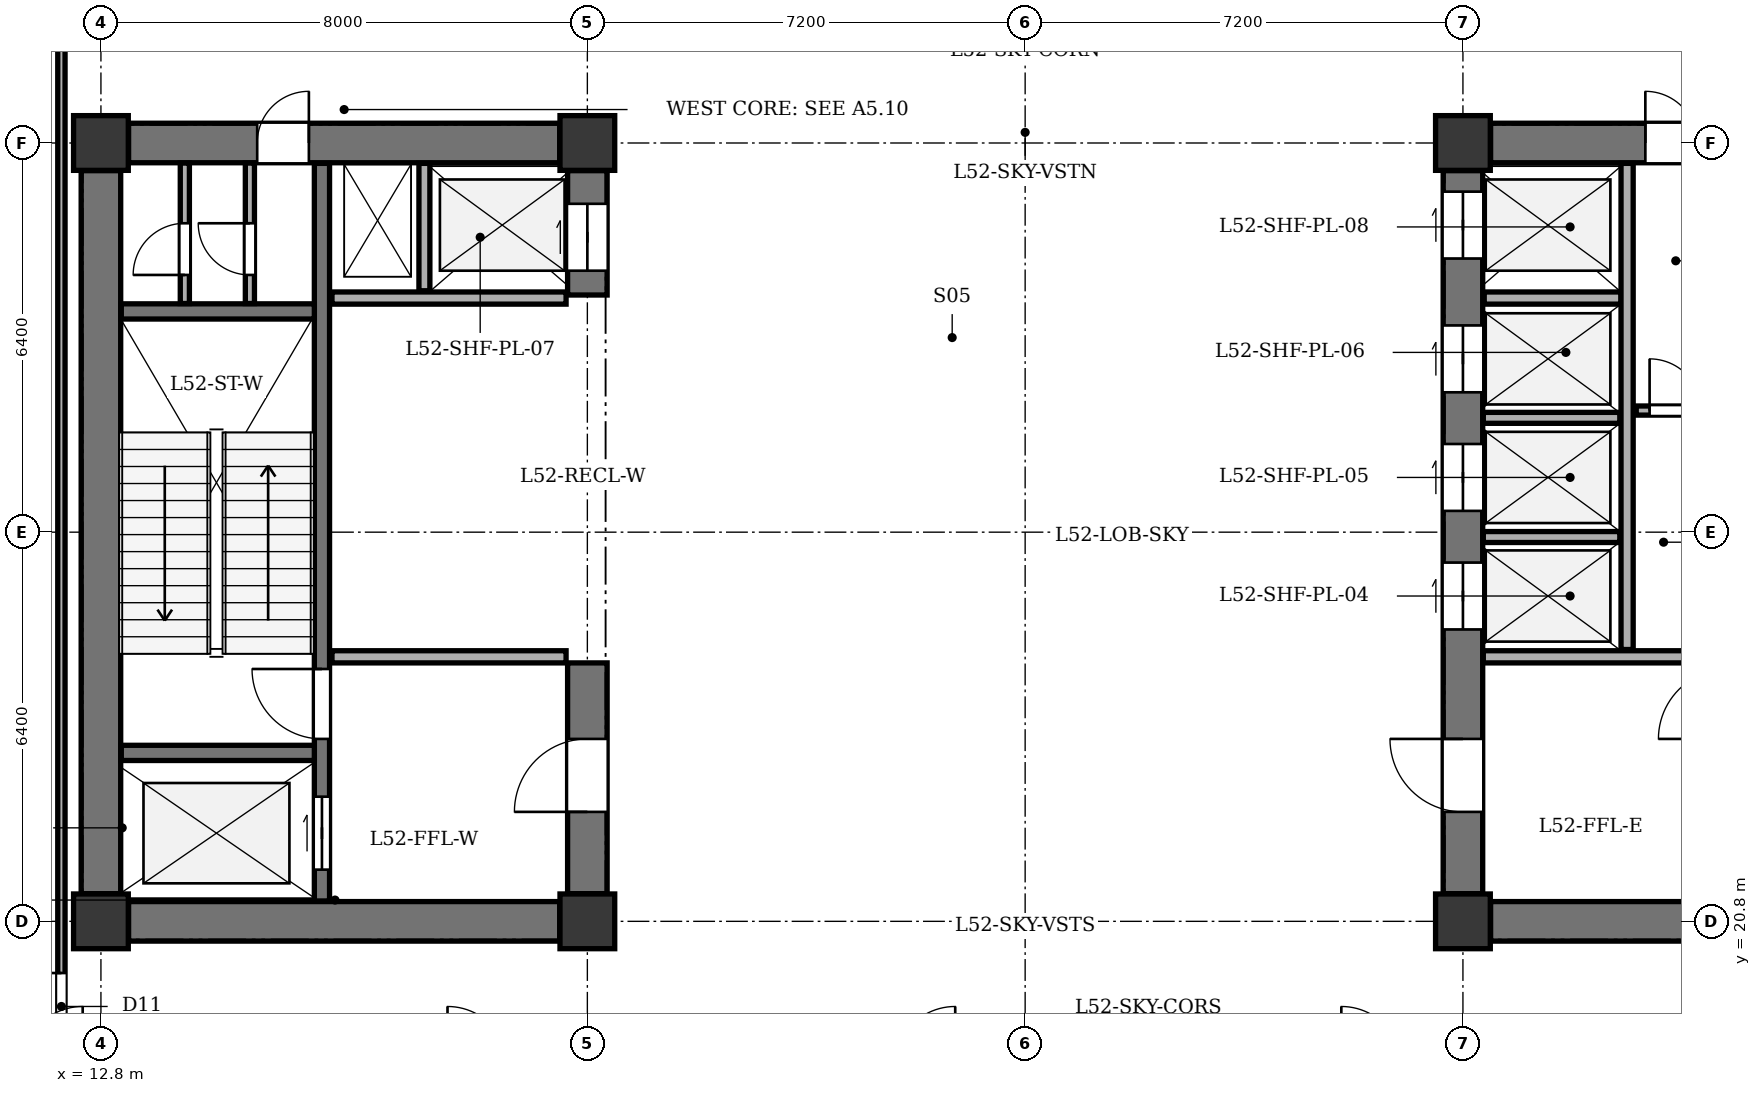
"""IFC4 building model, lengths in metres.
Left out: names, types, materials, properties, quantities, classifications, styles, units other than length and angle.
Written with IfcOpenShell. Run it as: python <this file> out.ifc"""

import sys

from ifc_helpers import new_model, si_unit, direction, frame, frame_2d, origin, origin_2d, place, context, subcontext, project, spatial, rectangle, extrude, element, fill, save


model = new_model("IFC4")
c1 = context("Model", 3, precision=1e-05, world=origin(), true_north=direction((0.0, 1.0)))
c2 = subcontext(c1, "Body", "Model", "MODEL_VIEW")
j1 = project(units=[si_unit("LENGTHUNIT", "METRE"), si_unit("PLANEANGLEUNIT", "RADIAN")], contexts=[c1])
p1 = place(None, origin())
s1 = spatial("IfcSite", under=j1, at=p1, CompositionType="ELEMENT")
p2 = place(p1, origin())
s2 = spatial("IfcBuilding", under=s1, at=p2, CompositionType="ELEMENT")
p3 = place(p2, frame((0.0, 0.0, 202.7)))
s3 = spatial("IfcBuildingStorey", under=s2, at=p3, CompositionType="ELEMENT", Elevation=202.7)
for number, where, z_axis, x_axis in (
    (1, (12.8, 20.8, 0.0), (0.0, 0.0, 1.0), (1.0, 0.0, 0.0)),
    (2, (20.8, 20.8, 0.0), (0.0, 0.0, 1.0), (1.0, 0.0, 0.0)),
    (3, (12.8, 33.6, 0.0), (0.0, 0.0, 1.0), (1.0, 0.0, 0.0)),
    (4, (20.8, 33.6, 0.0), (0.0, 0.0, 1.0), (1.0, 0.0, 0.0)),
    (5, (35.2, 20.8, 0.0), (0.0, 0.0, 1.0), (1.0, 0.0, 0.0)),
    (6, (35.2, 33.6, 0.0), (0.0, 0.0, 1.0), (1.0, 0.0, 0.0)),
):
    element("IfcColumn", number, at=place(p3, frame(where, z_axis=z_axis, x_axis=x_axis)), inside=s3, PredefinedType="COLUMN", context=c2, shape_type="SweptSolid", body=[
        extrude(rectangle(XDim=0.9, YDim=0.9, at=origin_2d()), origin(), (0.0, 0.0, 1.0), 4.8),
    ])
p4 = place(p3, frame((12.8, 21.255, 0.0), z_axis=(0.0, 0.0, 1.0), x_axis=(0.0, 1.0, 0.0)))
e7 = element("IfcWall", 7, at=p4, inside=s3, PredefinedType="SHEAR", context=c2, shape_type="SweptSolid", body=[
    extrude(rectangle(XDim=11.89, YDim=0.65, at=frame_2d((5.945, 0.0))), origin(), (0.0, 0.0, 1.0), 4.35),
])
p5 = place(p3, frame((13.255, 20.8, 0.0), z_axis=(0.0, 0.0, 1.0), x_axis=(1.0, 0.0, 0.0)))
e8 = element("IfcWall", 8, at=p5, inside=s3, PredefinedType="SHEAR", context=c2, shape_type="SweptSolid", body=[
    extrude(rectangle(XDim=7.09, YDim=0.65, at=frame_2d((3.545, 0.0))), origin(), (0.0, 0.0, 1.0), 4.35),
])
p6 = place(p3, frame((13.255, 33.6, 0.0), z_axis=(0.0, 0.0, 1.0), x_axis=(1.0, 0.0, 0.0)))
e9 = element("IfcWall", 9, at=p6, inside=s3, PredefinedType="SHEAR", context=c2, shape_type="SweptSolid", body=[
    extrude(rectangle(XDim=7.09, YDim=0.65, at=frame_2d((3.545, 0.0))), origin(), (0.0, 0.0, 1.0), 4.35),
])
p7 = place(p6, frame((2.115, 0.0, 0.0)))
e10 = element("IfcOpeningElement", 10, at=p7, cuts=e9, PredefinedType="OPENING", context=c2, shape_type="SweptSolid", body=[
    extrude(rectangle(XDim=0.85, YDim=2.02, at=frame_2d((0.425, 1.01))), frame((0.0, 0.335, 0.0), z_axis=(0.0, -1.0, 0.0), x_axis=(1.0, 0.0, 0.0)), (0.0, 0.0, 1.0), 0.67),
])
p8 = place(p3, frame((20.8, 21.255, 0.0), z_axis=(0.0, 0.0, 1.0), x_axis=(0.0, 1.0, 0.0)))
e11 = element("IfcWall", 11, at=p8, inside=s3, PredefinedType="SHEAR", context=c2, shape_type="SweptSolid", body=[
    extrude(rectangle(XDim=3.795, YDim=0.65, at=frame_2d((1.897, 0.0))), origin(), (0.0, 0.0, 1.0), 4.35),
])
p9 = place(p8, frame((1.345, 0.0, 0.0)))
e12 = element("IfcOpeningElement", 12, at=p9, cuts=e11, PredefinedType="OPENING", context=c2, shape_type="SweptSolid", body=[
    extrude(rectangle(XDim=1.2, YDim=2.15, at=frame_2d((0.6, 1.075))), frame((0.0, 0.335, 0.0), z_axis=(0.0, -1.0, 0.0), x_axis=(1.0, 0.0, 0.0)), (0.0, 0.0, 1.0), 0.67),
])
p10 = place(p3, frame((20.8, 31.1, 0.0), z_axis=(0.0, 0.0, 1.0), x_axis=(0.0, 1.0, 0.0)))
e13 = element("IfcWall", 13, at=p10, inside=s3, PredefinedType="SHEAR", context=c2, shape_type="SweptSolid", body=[
    extrude(rectangle(XDim=2.045, YDim=0.65, at=frame_2d((1.022, 0.0))), origin(), (0.0, 0.0, 1.0), 4.35),
])
p11 = place(p10, frame((0.4, 0.0, 0.0)))
e14 = element("IfcOpeningElement", 14, at=p11, cuts=e13, PredefinedType="OPENING", context=c2, shape_type="SweptSolid", body=[
    extrude(rectangle(XDim=1.1, YDim=2.1, at=frame_2d((0.55, 1.05))), frame((0.0, 0.335, 0.0), z_axis=(0.0, -1.0, 0.0), x_axis=(1.0, 0.0, 0.0)), (0.0, 0.0, 1.0), 0.67),
])
p12 = place(p3, frame((16.435, 21.135, 0.0), z_axis=(0.0, 0.0, 1.0), x_axis=(0.0, 1.0, 0.0)))
e15 = element("IfcWall", 15, at=p12, inside=s3, PredefinedType="SHEAR", context=c2, shape_type="SweptSolid", body=[
    extrude(rectangle(XDim=12.13, YDim=0.25, at=frame_2d((6.065, 0.0))), origin(), (0.0, 0.0, 1.0), 4.35),
])
p13 = place(p12, frame((0.515, 0.0, 0.0)))
e16 = element("IfcOpeningElement", 16, at=p13, cuts=e15, PredefinedType="OPENING", context=c2, shape_type="SweptSolid", body=[
    extrude(rectangle(XDim=1.2, YDim=2.15, at=frame_2d((0.6, 1.075))), frame((0.0, 0.135, 0.0), z_axis=(0.0, -1.0, 0.0), x_axis=(1.0, 0.0, 0.0)), (0.0, 0.0, 1.0), 0.27),
])
p14 = place(p12, frame((2.665, 0.0, 0.0)))
e17 = element("IfcOpeningElement", 17, at=p14, cuts=e15, PredefinedType="OPENING", context=c2, shape_type="SweptSolid", body=[
    extrude(rectangle(XDim=1.15, YDim=2.15, at=frame_2d((0.575, 1.075))), frame((0.0, 0.135, 0.0), z_axis=(0.0, -1.0, 0.0), x_axis=(1.0, 0.0, 0.0)), (0.0, 0.0, 1.0), 0.27),
])
for number, where, z_axis, x_axis in (
    (18, (13.135, 23.57, 0.0), (0.0, 0.0, 1.0), (1.0, 0.0, 0.0)),
    (19, (13.135, 30.83, 0.0), (0.0, 0.0, 1.0), (1.0, 0.0, 0.0)),
):
    element("IfcWall", number, at=place(p3, frame(where, z_axis=z_axis, x_axis=x_axis)), inside=s3, PredefinedType="SHEAR", context=c2, shape_type="SweptSolid", body=[
        extrude(rectangle(XDim=3.175, YDim=0.25, at=frame_2d((1.587, 0.0))), origin(), (0.0, 0.0, 1.0), 4.35),
    ])
for number, where, z_axis, x_axis in (
    (20, (16.6, 25.15, 0.0), (0.0, 0.0, 1.0), (1.0, 0.0, 0.0)),
    (21, (16.6, 31.05, 0.0), (0.0, 0.0, 1.0), (1.0, 0.0, 0.0)),
):
    element("IfcWall", number, at=place(p3, frame(where, z_axis=z_axis, x_axis=x_axis)), inside=s3, PredefinedType="SOLIDWALL", context=c2, shape_type="SweptSolid", body=[
        extrude(rectangle(XDim=3.85, YDim=0.2, at=frame_2d((1.925, 0.0))), origin(), (0.0, 0.0, 1.0), 4.35),
    ])
p15 = place(p3, frame((18.12, 31.17, 0.0), z_axis=(0.0, 0.0, 1.0), x_axis=(0.0, 1.0, 0.0)))
e22 = element("IfcWall", 22, at=p15, inside=s3, PredefinedType="PARTITIONING", context=c2, shape_type="SweptSolid", body=[
    extrude(rectangle(XDim=2.095, YDim=0.18, at=frame_2d((1.047, 0.0))), origin(), (0.0, 0.0, 1.0), 4.35),
])
p16 = place(p3, frame((35.655, 20.8, 0.0), z_axis=(0.0, 0.0, 1.0), x_axis=(1.0, 0.0, 0.0)))
e23 = element("IfcWall", 23, at=p16, inside=s3, PredefinedType="SHEAR", context=c2, shape_type="SweptSolid", body=[
    extrude(rectangle(XDim=7.09, YDim=0.65, at=frame_2d((3.545, 0.0))), origin(), (0.0, 0.0, 1.0), 4.35),
])
p17 = place(p3, frame((35.655, 33.6, 0.0), z_axis=(0.0, 0.0, 1.0), x_axis=(1.0, 0.0, 0.0)))
e24 = element("IfcWall", 24, at=p17, inside=s3, PredefinedType="SHEAR", context=c2, shape_type="SweptSolid", body=[
    extrude(rectangle(XDim=7.09, YDim=0.65, at=frame_2d((3.545, 0.0))), origin(), (0.0, 0.0, 1.0), 4.35),
])
p18 = place(p17, frame((4.745, 0.0, 0.0)))
e25 = element("IfcOpeningElement", 25, at=p18, cuts=e24, PredefinedType="OPENING", context=c2, shape_type="SweptSolid", body=[
    extrude(rectangle(XDim=1.3, YDim=2.15, at=frame_2d((0.65, 1.075))), frame((0.0, 0.335, 0.0), z_axis=(0.0, -1.0, 0.0), x_axis=(1.0, 0.0, 0.0)), (0.0, 0.0, 1.0), 0.67),
])
p19 = place(p17, frame((2.545, 0.0, 0.0)))
e26 = element("IfcOpeningElement", 26, at=p19, cuts=e24, PredefinedType="OPENING", context=c2, shape_type="SweptSolid", body=[
    extrude(rectangle(XDim=0.85, YDim=2.02, at=frame_2d((0.425, 1.01))), frame((0.0, 0.335, 0.0), z_axis=(0.0, -1.0, 0.0), x_axis=(1.0, 0.0, 0.0)), (0.0, 0.0, 1.0), 0.67),
])
p20 = place(p3, frame((35.2, 21.255, 0.0), z_axis=(0.0, 0.0, 1.0), x_axis=(0.0, 1.0, 0.0)))
e27 = element("IfcWall", 27, at=p20, inside=s3, PredefinedType="SHEAR", context=c2, shape_type="SweptSolid", body=[
    extrude(rectangle(XDim=11.89, YDim=0.65, at=frame_2d((5.945, 0.0))), origin(), (0.0, 0.0, 1.0), 4.35),
])
p21 = place(p20, frame((1.345, 0.0, 0.0)))
e28 = element("IfcOpeningElement", 28, at=p21, cuts=e27, PredefinedType="OPENING", context=c2, shape_type="SweptSolid", body=[
    extrude(rectangle(XDim=1.2, YDim=2.15, at=frame_2d((0.6, 1.075))), frame((0.0, 0.335, 0.0), z_axis=(0.0, -1.0, 0.0), x_axis=(1.0, 0.0, 0.0)), (0.0, 0.0, 1.0), 0.67),
])
p22 = place(p20, frame((4.345, 0.0, 0.0)))
e29 = element("IfcOpeningElement", 29, at=p22, cuts=e27, PredefinedType="OPENING", context=c2, shape_type="SweptSolid", body=[
    extrude(rectangle(XDim=1.1, YDim=2.1, at=frame_2d((0.55, 1.05))), frame((0.0, 0.335, 0.0), z_axis=(0.0, -1.0, 0.0), x_axis=(1.0, 0.0, 0.0)), (0.0, 0.0, 1.0), 0.67),
])
p23 = place(p20, frame((6.295, 0.0, 0.0)))
e30 = element("IfcOpeningElement", 30, at=p23, cuts=e27, PredefinedType="OPENING", context=c2, shape_type="SweptSolid", body=[
    extrude(rectangle(XDim=1.1, YDim=2.1, at=frame_2d((0.55, 1.05))), frame((0.0, 0.335, 0.0), z_axis=(0.0, -1.0, 0.0), x_axis=(1.0, 0.0, 0.0)), (0.0, 0.0, 1.0), 0.67),
])
p24 = place(p20, frame((8.245, 0.0, 0.0)))
e31 = element("IfcOpeningElement", 31, at=p24, cuts=e27, PredefinedType="OPENING", context=c2, shape_type="SweptSolid", body=[
    extrude(rectangle(XDim=1.1, YDim=2.1, at=frame_2d((0.55, 1.05))), frame((0.0, 0.335, 0.0), z_axis=(0.0, -1.0, 0.0), x_axis=(1.0, 0.0, 0.0)), (0.0, 0.0, 1.0), 0.67),
])
p25 = place(p20, frame((10.445, 0.0, 0.0)))
e32 = element("IfcOpeningElement", 32, at=p25, cuts=e27, PredefinedType="OPENING", context=c2, shape_type="SweptSolid", body=[
    extrude(rectangle(XDim=1.1, YDim=2.1, at=frame_2d((0.55, 1.05))), frame((0.0, 0.335, 0.0), z_axis=(0.0, -1.0, 0.0), x_axis=(1.0, 0.0, 0.0)), (0.0, 0.0, 1.0), 0.67),
])
p26 = place(p3, frame((35.535, 25.15, 0.0), z_axis=(0.0, 0.0, 1.0), x_axis=(1.0, 0.0, 0.0)))
e33 = element("IfcWall", 33, at=p26, inside=s3, PredefinedType="SOLIDWALL", context=c2, shape_type="SweptSolid", body=[
    extrude(rectangle(XDim=3.865, YDim=0.2, at=frame_2d((1.933, 0.0))), origin(), (0.0, 0.0, 1.0), 4.35),
])
p27 = place(p3, frame((35.55, 31.05, 0.0), z_axis=(0.0, 0.0, 1.0), x_axis=(1.0, 0.0, 0.0)))
e34 = element("IfcWall", 34, at=p27, inside=s3, PredefinedType="SOLIDWALL", context=c2, shape_type="SweptSolid", body=[
    extrude(rectangle(XDim=2.25, YDim=0.2, at=frame_2d((1.125, 0.0))), origin(), (0.0, 0.0, 1.0), 4.35),
])
p28 = place(p3, frame((37.9, 25.27, 0.0), z_axis=(0.0, 0.0, 1.0), x_axis=(0.0, 1.0, 0.0)))
e35 = element("IfcWall", 35, at=p28, inside=s3, PredefinedType="SOLIDWALL", context=c2, shape_type="SweptSolid", body=[
    extrude(rectangle(XDim=7.995, YDim=0.2, at=frame_2d((3.998, 0.0))), origin(), (0.0, 0.0, 1.0), 4.35),
])
for number, where, z_axis, x_axis in (
    (36, (35.535, 27.12, 0.0), (0.0, 0.0, 1.0), (1.0, 0.0, 0.0)),
    (37, (35.535, 29.08, 0.0), (0.0, 0.0, 1.0), (1.0, 0.0, 0.0)),
):
    element("IfcWall", number, at=place(p3, frame(where, z_axis=z_axis, x_axis=x_axis)), inside=s3, PredefinedType="PARTITIONING", context=c2, shape_type="SweptSolid", body=[
        extrude(rectangle(XDim=2.245, YDim=0.18, at=frame_2d((1.123, 0.0))), origin(), (0.0, 0.0, 1.0), 4.35),
    ])
p29 = place(p3, frame((14.18, 30.96, 0.0), z_axis=(0.0, 0.0, 1.0), x_axis=(0.0, 1.0, 0.0)))
e38 = element("IfcWall", 38, at=p29, inside=s3, PredefinedType="PARTITIONING", context=c2, shape_type="SweptSolid", body=[
    extrude(rectangle(XDim=2.31, YDim=0.15, at=frame_2d((1.155, 0.0))), origin(), (0.0, 0.0, 1.0), 4.35),
])
p30 = place(p29, frame((0.47, 0.0, 0.0)))
e39 = element("IfcOpeningElement", 39, at=p30, cuts=e38, PredefinedType="OPENING", context=c2, shape_type="SweptSolid", body=[
    extrude(rectangle(XDim=0.85, YDim=2.02, at=frame_2d((0.425, 1.01))), frame((0.0, 0.085, 0.0), z_axis=(0.0, -1.0, 0.0), x_axis=(1.0, 0.0, 0.0)), (0.0, 0.0, 1.0), 0.17),
])
p31 = place(p3, frame((15.25, 30.96, 0.0), z_axis=(0.0, 0.0, 1.0), x_axis=(0.0, 1.0, 0.0)))
e40 = element("IfcWall", 40, at=p31, inside=s3, PredefinedType="PARTITIONING", context=c2, shape_type="SweptSolid", body=[
    extrude(rectangle(XDim=2.31, YDim=0.15, at=frame_2d((1.155, 0.0))), origin(), (0.0, 0.0, 1.0), 4.35),
])
p32 = place(p31, frame((0.47, 0.0, 0.0)))
e41 = element("IfcOpeningElement", 41, at=p32, cuts=e40, PredefinedType="OPENING", context=c2, shape_type="SweptSolid", body=[
    extrude(rectangle(XDim=0.85, YDim=2.02, at=frame_2d((0.425, 1.01))), frame((0.0, 0.085, 0.0), z_axis=(0.0, -1.0, 0.0), x_axis=(1.0, 0.0, 0.0)), (0.0, 0.0, 1.0), 0.17),
])
p33 = place(p3, frame((38.05, 29.2, 0.0), z_axis=(0.0, 0.0, 1.0), x_axis=(1.0, 0.0, 0.0)))
e42 = element("IfcWall", 42, at=p33, inside=s3, PredefinedType="PARTITIONING", context=c2, shape_type="SweptSolid", body=[
    extrude(rectangle(XDim=1.3, YDim=0.15, at=frame_2d((0.65, 0.0))), origin(), (0.0, 0.0, 1.0), 4.35),
])
p34 = place(p33, frame((0.22, 0.0, 0.0)))
e43 = element("IfcOpeningElement", 43, at=p34, cuts=e42, PredefinedType="OPENING", context=c2, shape_type="SweptSolid", body=[
    extrude(rectangle(XDim=0.85, YDim=2.02, at=frame_2d((0.425, 1.01))), frame((0.0, 0.085, 0.0), z_axis=(0.0, -1.0, 0.0), x_axis=(1.0, 0.0, 0.0)), (0.0, 0.0, 1.0), 0.17),
])
p35 = place(p3, frame((12.15, 18.465, 0.0), z_axis=(0.0, 0.0, 1.0), x_axis=(0.0, 1.0, 0.0)))
e44 = element("IfcWall", 44, at=p35, inside=s3, PredefinedType="PARTITIONING", context=c2, shape_type="SweptSolid", body=[
    extrude(rectangle(XDim=17.67, YDim=0.12, at=frame_2d((8.835, 0.0))), origin(), (0.0, 0.0, 1.0), 4.35),
])
p36 = place(p35, frame((0.385, 0.0, 0.0)))
e45 = element("IfcOpeningElement", 45, at=p36, cuts=e44, PredefinedType="OPENING", context=c2, shape_type="SweptSolid", body=[
    extrude(rectangle(XDim=1.1, YDim=2.15, at=frame_2d((0.55, 1.075))), frame((0.0, 0.07, 0.0), z_axis=(0.0, -1.0, 0.0), x_axis=(1.0, 0.0, 0.0)), (0.0, 0.0, 1.0), 0.14),
])
p37 = place(p7, origin())
e46 = element("IfcDoor", 46, at=p37, inside=s3, OperationType="SINGLE_SWING_RIGHT", PredefinedType="DOOR", context=c2, shape_type="SweptSolid", body=[
    extrude(rectangle(XDim=0.85, YDim=2.02, at=frame_2d((0.425, 1.01))), frame((0.0, 0.025, 0.0), z_axis=(0.0, -1.0, 0.0), x_axis=(1.0, 0.0, 0.0)), (0.0, 0.0, 1.0), 0.05),
])
fill(e10, e46)
p38 = place(p9, origin())
e47 = element("IfcDoor", 47, at=p38, inside=s3, OperationType="SINGLE_SWING_LEFT", PredefinedType="DOOR", context=c2, shape_type="SweptSolid", body=[
    extrude(rectangle(XDim=1.2, YDim=2.15, at=frame_2d((0.6, 1.075))), frame((0.0, 0.025, 0.0), z_axis=(0.0, -1.0, 0.0), x_axis=(1.0, 0.0, 0.0)), (0.0, 0.0, 1.0), 0.05),
])
fill(e12, e47)
p39 = place(p11, origin())
e48 = element("IfcDoor", 48, at=p39, inside=s3, OperationType="DOUBLE_DOOR_SLIDING", PredefinedType="DOOR", context=c2, shape_type="SweptSolid", body=[
    extrude(rectangle(XDim=1.1, YDim=2.1, at=frame_2d((0.55, 1.05))), frame((0.0, 0.025, 0.0), z_axis=(0.0, -1.0, 0.0), x_axis=(1.0, 0.0, 0.0)), (0.0, 0.0, 1.0), 0.05),
])
fill(e14, e48)
p40 = place(p13, origin())
e49 = element("IfcDoor", 49, at=p40, inside=s3, OperationType="DOUBLE_DOOR_SLIDING", PredefinedType="DOOR", context=c2, shape_type="SweptSolid", body=[
    extrude(rectangle(XDim=1.2, YDim=2.15, at=frame_2d((0.6, 1.075))), frame((0.0, 0.025, 0.0), z_axis=(0.0, -1.0, 0.0), x_axis=(1.0, 0.0, 0.0)), (0.0, 0.0, 1.0), 0.05),
])
fill(e16, e49)
p41 = place(p14, origin())
e50 = element("IfcDoor", 50, at=p41, inside=s3, OperationType="SINGLE_SWING_RIGHT", PredefinedType="DOOR", context=c2, shape_type="SweptSolid", body=[
    extrude(rectangle(XDim=1.15, YDim=2.15, at=frame_2d((0.575, 1.075))), frame((0.0, 0.025, 0.0), z_axis=(0.0, -1.0, 0.0), x_axis=(1.0, 0.0, 0.0)), (0.0, 0.0, 1.0), 0.05),
])
fill(e17, e50)
p42 = place(p19, origin())
e51 = element("IfcDoor", 51, at=p42, inside=s3, OperationType="SINGLE_SWING_LEFT", PredefinedType="DOOR", context=c2, shape_type="SweptSolid", body=[
    extrude(rectangle(XDim=0.85, YDim=2.02, at=frame_2d((0.425, 1.01))), frame((0.0, 0.025, 0.0), z_axis=(0.0, -1.0, 0.0), x_axis=(1.0, 0.0, 0.0)), (0.0, 0.0, 1.0), 0.05),
])
fill(e26, e51)
p43 = place(p21, origin())
e52 = element("IfcDoor", 52, at=p43, inside=s3, OperationType="SINGLE_SWING_RIGHT", PredefinedType="DOOR", context=c2, shape_type="SweptSolid", body=[
    extrude(rectangle(XDim=1.2, YDim=2.15, at=frame_2d((0.6, 1.075))), frame((0.0, 0.025, 0.0), z_axis=(0.0, -1.0, 0.0), x_axis=(1.0, 0.0, 0.0)), (0.0, 0.0, 1.0), 0.05),
])
fill(e28, e52)
p44 = place(p22, origin())
e53 = element("IfcDoor", 53, at=p44, inside=s3, OperationType="DOUBLE_DOOR_SLIDING", PredefinedType="DOOR", context=c2, shape_type="SweptSolid", body=[
    extrude(rectangle(XDim=1.1, YDim=2.1, at=frame_2d((0.55, 1.05))), frame((0.0, 0.025, 0.0), z_axis=(0.0, -1.0, 0.0), x_axis=(1.0, 0.0, 0.0)), (0.0, 0.0, 1.0), 0.05),
])
fill(e29, e53)
p45 = place(p23, origin())
e54 = element("IfcDoor", 54, at=p45, inside=s3, OperationType="DOUBLE_DOOR_SLIDING", PredefinedType="DOOR", context=c2, shape_type="SweptSolid", body=[
    extrude(rectangle(XDim=1.1, YDim=2.1, at=frame_2d((0.55, 1.05))), frame((0.0, 0.025, 0.0), z_axis=(0.0, -1.0, 0.0), x_axis=(1.0, 0.0, 0.0)), (0.0, 0.0, 1.0), 0.05),
])
fill(e30, e54)
p46 = place(p24, origin())
e55 = element("IfcDoor", 55, at=p46, inside=s3, OperationType="DOUBLE_DOOR_SLIDING", PredefinedType="DOOR", context=c2, shape_type="SweptSolid", body=[
    extrude(rectangle(XDim=1.1, YDim=2.1, at=frame_2d((0.55, 1.05))), frame((0.0, 0.025, 0.0), z_axis=(0.0, -1.0, 0.0), x_axis=(1.0, 0.0, 0.0)), (0.0, 0.0, 1.0), 0.05),
])
fill(e31, e55)
p47 = place(p25, origin())
e56 = element("IfcDoor", 56, at=p47, inside=s3, OperationType="DOUBLE_DOOR_SLIDING", PredefinedType="DOOR", context=c2, shape_type="SweptSolid", body=[
    extrude(rectangle(XDim=1.1, YDim=2.1, at=frame_2d((0.55, 1.05))), frame((0.0, 0.025, 0.0), z_axis=(0.0, -1.0, 0.0), x_axis=(1.0, 0.0, 0.0)), (0.0, 0.0, 1.0), 0.05),
])
fill(e32, e56)
p48 = place(p30, origin())
e57 = element("IfcDoor", 57, at=p48, inside=s3, OperationType="SINGLE_SWING_LEFT", PredefinedType="DOOR", context=c2, shape_type="SweptSolid", body=[
    extrude(rectangle(XDim=0.85, YDim=2.02, at=frame_2d((0.425, 1.01))), frame((0.0, 0.025, 0.0), z_axis=(0.0, -1.0, 0.0), x_axis=(1.0, 0.0, 0.0)), (0.0, 0.0, 1.0), 0.05),
])
fill(e39, e57)
p49 = place(p32, origin())
e58 = element("IfcDoor", 58, at=p49, inside=s3, OperationType="SINGLE_SWING_RIGHT", PredefinedType="DOOR", context=c2, shape_type="SweptSolid", body=[
    extrude(rectangle(XDim=0.85, YDim=2.02, at=frame_2d((0.425, 1.01))), frame((0.0, 0.025, 0.0), z_axis=(0.0, -1.0, 0.0), x_axis=(1.0, 0.0, 0.0)), (0.0, 0.0, 1.0), 0.05),
])
fill(e41, e58)
p50 = place(p34, origin())
e59 = element("IfcDoor", 59, at=p50, inside=s3, OperationType="SINGLE_SWING_LEFT", PredefinedType="DOOR", context=c2, shape_type="SweptSolid", body=[
    extrude(rectangle(XDim=0.85, YDim=2.02, at=frame_2d((0.425, 1.01))), frame((0.0, 0.025, 0.0), z_axis=(0.0, -1.0, 0.0), x_axis=(1.0, 0.0, 0.0)), (0.0, 0.0, 1.0), 0.05),
])
fill(e43, e59)
p51 = place(p36, origin())
e60 = element("IfcDoor", 60, at=p51, inside=s3, OperationType="SINGLE_SWING_RIGHT", PredefinedType="DOOR", context=c2, shape_type="SweptSolid", body=[
    extrude(rectangle(XDim=1.1, YDim=2.15, at=frame_2d((0.55, 1.075))), frame((0.0, 0.025, 0.0), z_axis=(0.0, -1.0, 0.0), x_axis=(1.0, 0.0, 0.0)), (0.0, 0.0, 1.0), 0.05),
])
fill(e45, e60)
save(model, sys.argv[1])
